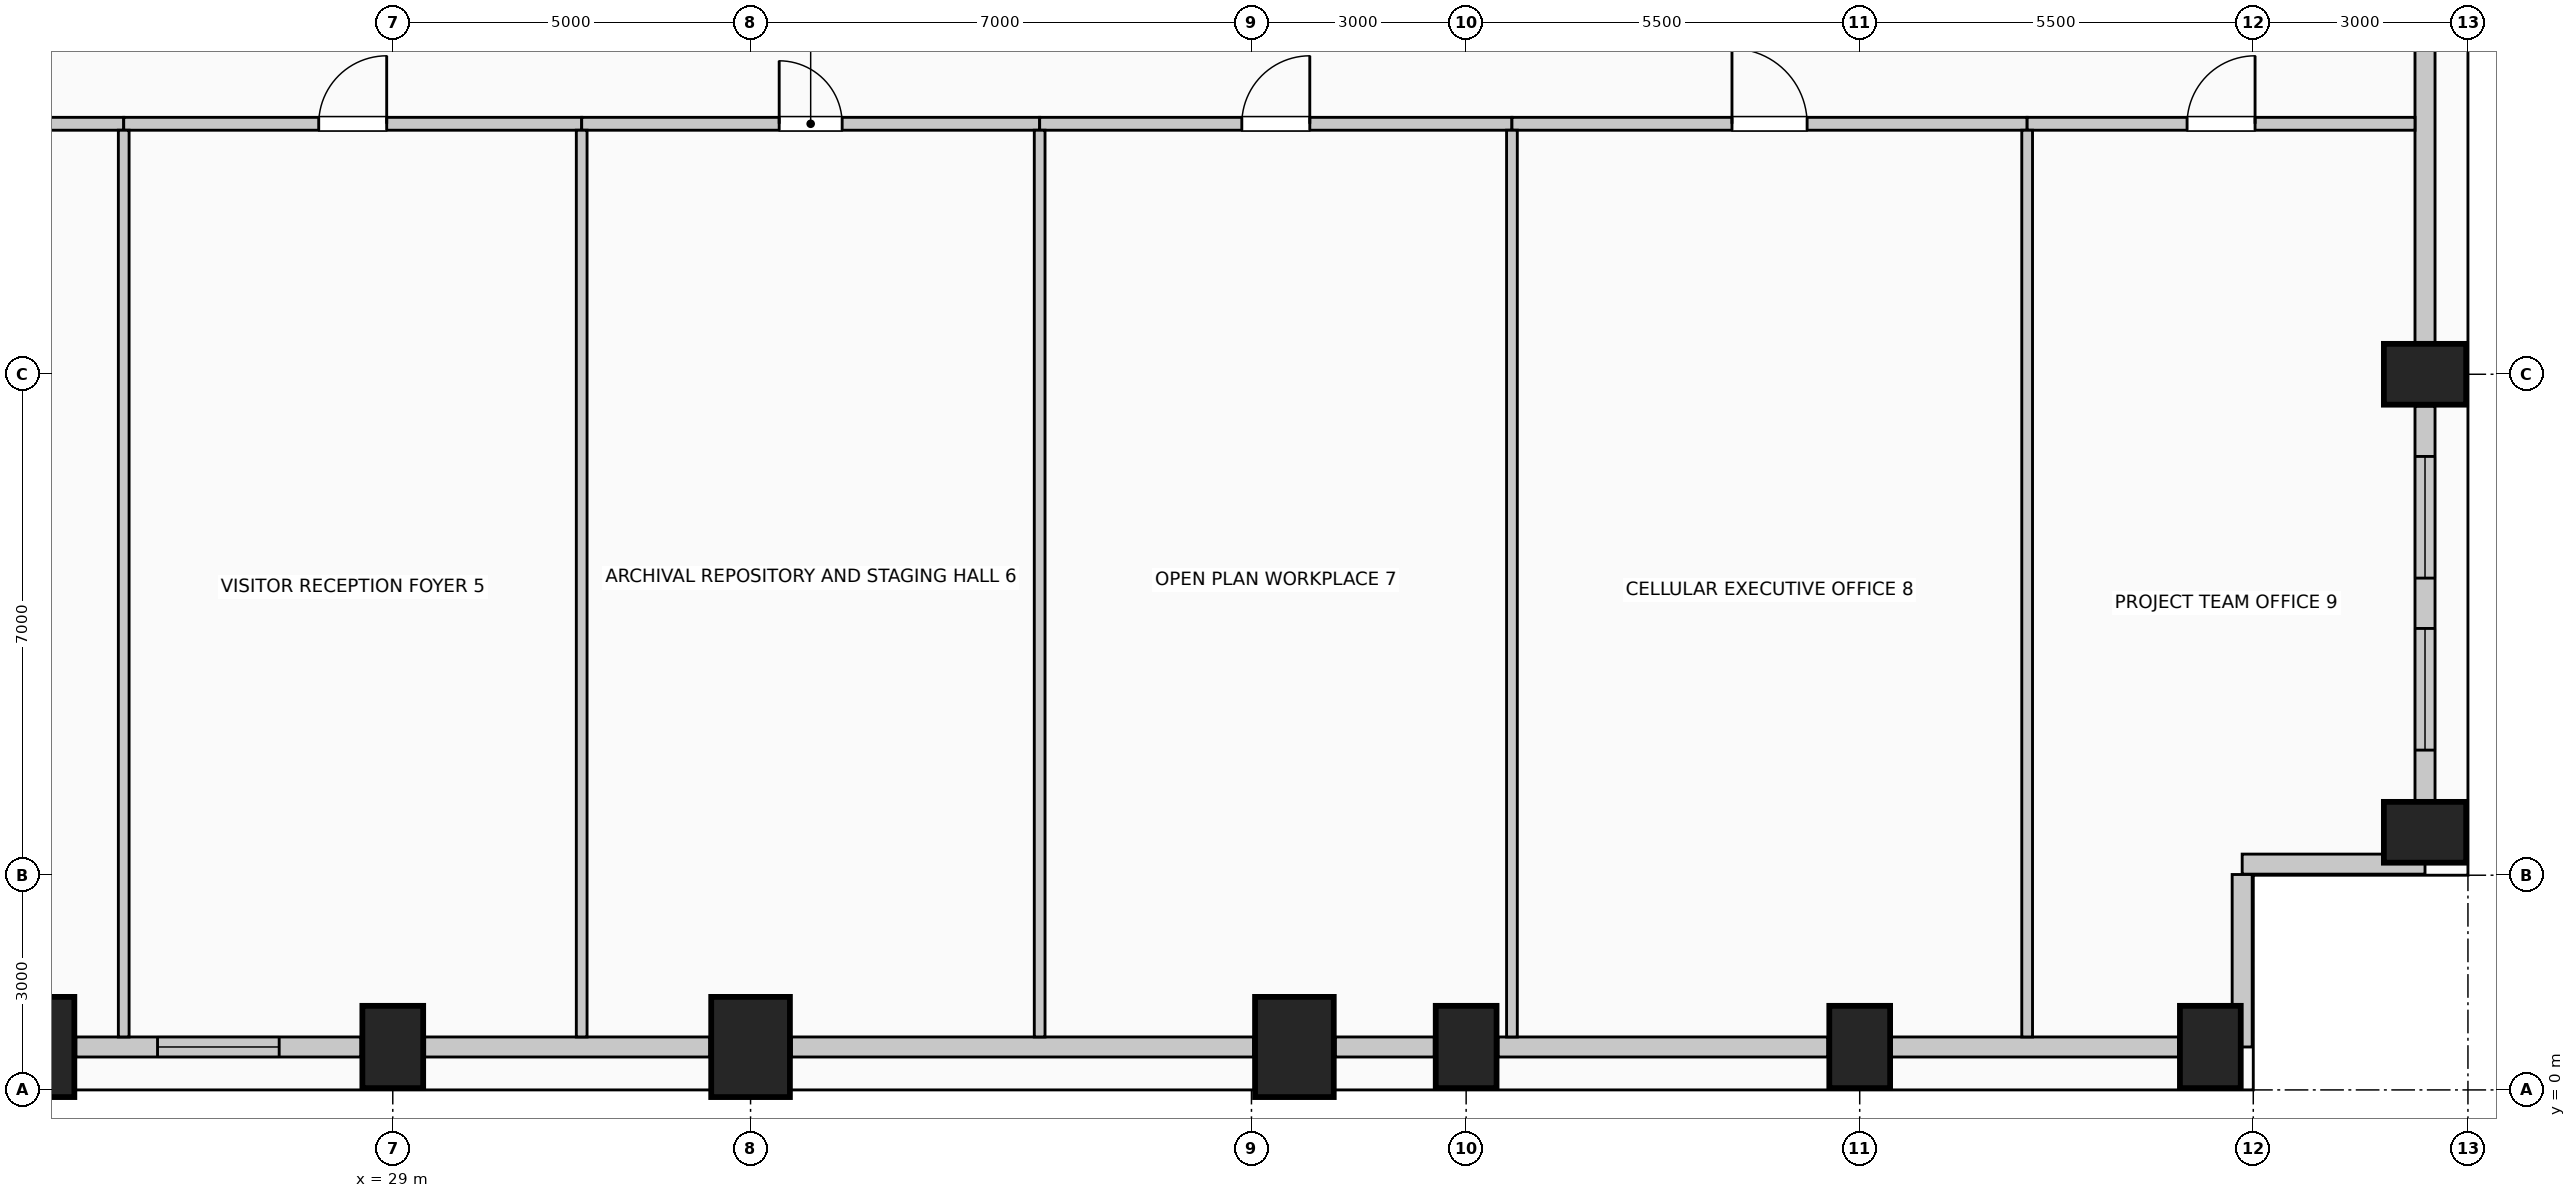
"""IFC4 building model, lengths in metres.
Left out: names, types, materials, properties, quantities, classifications, styles, units other than length and angle.
Written with IfcOpenShell. Run it as: python <this file> out.ifc"""

import sys

from ifc_helpers import new_model, si_unit, direction, frame, frame_2d, origin, origin_2d, place, context, subcontext, project, spatial, rectangle, extrude, element, fill, save


model = new_model("IFC4")
c1 = context("Model", 3, precision=1e-05, world=origin(), true_north=direction((0.0, 1.0)))
c2 = subcontext(c1, "Body", "Model", "MODEL_VIEW")
j1 = project(units=[si_unit("LENGTHUNIT", "METRE"), si_unit("PLANEANGLEUNIT", "RADIAN")], contexts=[c1])
p1 = place(None, origin())
s1 = spatial("IfcSite", under=j1, at=p1, CompositionType="ELEMENT")
p2 = place(p1, origin())
s2 = spatial("IfcBuilding", under=s1, at=p2, CompositionType="ELEMENT")
p3 = place(p2, frame((0.0, 0.0, 144.6)))
s3 = spatial("IfcBuildingStorey", under=s2, at=p3, CompositionType="ELEMENT", Elevation=144.6)
p4 = place(p3, frame((24.0, 0.6, 0.0), z_axis=(0.0, 0.0, 1.0), x_axis=(1.0, 0.0, 0.0)))
e1 = element("IfcColumn", 1, at=p4, inside=s3, PredefinedType="COLUMN", context=c2, shape_type="SweptSolid", body=[
    extrude(rectangle(XDim=1.1, YDim=1.4, at=origin_2d()), origin(), (0.0, 0.0, 1.0), 4.0),
])
p5 = place(p3, frame((29.0, 0.6, 0.0), z_axis=(0.0, 0.0, 1.0), x_axis=(1.0, 0.0, 0.0)))
e2 = element("IfcColumn", 2, at=p5, inside=s3, PredefinedType="COLUMN", context=c2, shape_type="SweptSolid", body=[
    extrude(rectangle(XDim=0.85, YDim=1.15, at=origin_2d()), origin(), (0.0, 0.0, 1.0), 4.0),
])
for number, where, z_axis, x_axis in (
    (3, (34.0, 0.6, 0.0), (0.0, 0.0, 1.0), (1.0, 0.0, 0.0)),
    (4, (41.6, 0.6, 0.0), (0.0, 0.0, 1.0), (1.0, 0.0, 0.0)),
):
    element("IfcColumn", number, at=place(p3, frame(where, z_axis=z_axis, x_axis=x_axis)), inside=s3, PredefinedType="COLUMN", context=c2, shape_type="SweptSolid", body=[
        extrude(rectangle(XDim=1.1, YDim=1.4, at=origin_2d()), origin(), (0.0, 0.0, 1.0), 4.0),
    ])
for number, where, z_axis, x_axis in (
    (5, (44.0, 0.6, 0.0), (0.0, 0.0, 1.0), (1.0, 0.0, 0.0)),
    (6, (49.5, 0.6, 0.0), (0.0, 0.0, 1.0), (1.0, 0.0, 0.0)),
    (7, (54.4, 0.6, 0.0), (0.0, 0.0, 1.0), (1.0, 0.0, 0.0)),
    (8, (57.4, 3.6, 0.0), (0.0, 0.0, 1.0), (0.0, 1.0, 0.0)),
    (9, (57.4, 10.0, 0.0), (0.0, 0.0, 1.0), (0.0, 1.0, 0.0)),
):
    element("IfcColumn", number, at=place(p3, frame(where, z_axis=z_axis, x_axis=x_axis)), inside=s3, PredefinedType="COLUMN", context=c2, shape_type="SweptSolid", body=[
        extrude(rectangle(XDim=0.85, YDim=1.15, at=origin_2d()), origin(), (0.0, 0.0, 1.0), 4.0),
    ])
p6 = place(p3, frame((28.555, 0.6, 0.0), z_axis=(0.0, 0.0, 1.0), x_axis=(-1.0, 0.0, 0.0)))
e10 = element("IfcWall", 10, at=p6, inside=s3, PredefinedType="SOLIDWALL", context=c2, shape_type="SweptSolid", body=[
    extrude(rectangle(XDim=3.985, YDim=0.28, at=frame_2d((1.992, 0.0))), origin(), (0.0, 0.0, 1.0), 2.875),
])
p7 = place(p6, frame((1.143, 0.0, 0.5)))
e11 = element("IfcOpeningElement", 11, at=p7, cuts=e10, PredefinedType="OPENING", context=c2, shape_type="SweptSolid", body=[
    extrude(rectangle(XDim=1.7, YDim=1.95, at=frame_2d((0.85, 0.975))), frame((0.0, 0.15, 0.0), z_axis=(0.0, -1.0, 0.0), x_axis=(1.0, 0.0, 0.0)), (0.0, 0.0, 1.0), 0.3),
])
p8 = place(p3, frame((33.43, 0.6, 0.0), z_axis=(0.0, 0.0, 1.0), x_axis=(-1.0, 0.0, 0.0)))
e12 = element("IfcWall", 12, at=p8, inside=s3, PredefinedType="SOLIDWALL", context=c2, shape_type="SweptSolid", body=[
    extrude(rectangle(XDim=3.985, YDim=0.28, at=frame_2d((1.992, 0.0))), origin(), (0.0, 0.0, 1.0), 2.875),
])
p9 = place(p3, frame((41.03, 0.6, 0.0), z_axis=(0.0, 0.0, 1.0), x_axis=(-1.0, 0.0, 0.0)))
e13 = element("IfcWall", 13, at=p9, inside=s3, PredefinedType="SOLIDWALL", context=c2, shape_type="SweptSolid", body=[
    extrude(rectangle(XDim=6.46, YDim=0.28, at=frame_2d((3.23, 0.0))), origin(), (0.0, 0.0, 1.0), 2.875),
])
p10 = place(p3, frame((43.555, 0.6, 0.0), z_axis=(0.0, 0.0, 1.0), x_axis=(-1.0, 0.0, 0.0)))
e14 = element("IfcWall", 14, at=p10, inside=s3, PredefinedType="SOLIDWALL", context=c2, shape_type="SweptSolid", body=[
    extrude(rectangle(XDim=1.385, YDim=0.28, at=frame_2d((0.692, 0.0))), origin(), (0.0, 0.0, 1.0), 2.875),
])
p11 = place(p3, frame((49.055, 0.6, 0.0), z_axis=(0.0, 0.0, 1.0), x_axis=(-1.0, 0.0, 0.0)))
e15 = element("IfcWall", 15, at=p11, inside=s3, PredefinedType="SOLIDWALL", context=c2, shape_type="SweptSolid", body=[
    extrude(rectangle(XDim=4.61, YDim=0.28, at=frame_2d((2.305, 0.0))), origin(), (0.0, 0.0, 1.0), 2.875),
])
p12 = place(p3, frame((53.955, 0.6, 0.0), z_axis=(0.0, 0.0, 1.0), x_axis=(-1.0, 0.0, 0.0)))
e16 = element("IfcWall", 16, at=p12, inside=s3, PredefinedType="SOLIDWALL", context=c2, shape_type="SweptSolid", body=[
    extrude(rectangle(XDim=4.01, YDim=0.28, at=frame_2d((2.005, 0.0))), origin(), (0.0, 0.0, 1.0), 2.875),
])
p13 = place(p3, frame((57.4, 9.555, 0.0), z_axis=(0.0, 0.0, 1.0), x_axis=(0.0, -1.0, 0.0)))
e17 = element("IfcWall", 17, at=p13, inside=s3, PredefinedType="SOLIDWALL", context=c2, shape_type="SweptSolid", body=[
    extrude(rectangle(XDim=5.51, YDim=0.28, at=frame_2d((2.755, 0.0))), origin(), (0.0, 0.0, 1.0), 2.875),
])
p14 = place(p13, frame((0.703, 0.0, 0.5)))
e18 = element("IfcOpeningElement", 18, at=p14, cuts=e17, PredefinedType="OPENING", context=c2, shape_type="SweptSolid", body=[
    extrude(rectangle(XDim=1.7, YDim=1.95, at=frame_2d((0.85, 0.975))), frame((0.0, 0.15, 0.0), z_axis=(0.0, -1.0, 0.0), x_axis=(1.0, 0.0, 0.0)), (0.0, 0.0, 1.0), 0.3),
])
p15 = place(p13, frame((3.107, 0.0, 0.5)))
e19 = element("IfcOpeningElement", 19, at=p15, cuts=e17, PredefinedType="OPENING", context=c2, shape_type="SweptSolid", body=[
    extrude(rectangle(XDim=1.7, YDim=1.95, at=frame_2d((0.85, 0.975))), frame((0.0, 0.15, 0.0), z_axis=(0.0, -1.0, 0.0), x_axis=(1.0, 0.0, 0.0)), (0.0, 0.0, 1.0), 0.3),
])
p16 = place(p3, frame((57.4, 17.555, 0.0), z_axis=(0.0, 0.0, 1.0), x_axis=(0.0, -1.0, 0.0)))
e20 = element("IfcWall", 20, at=p16, inside=s3, PredefinedType="SOLIDWALL", context=c2, shape_type="SweptSolid", body=[
    extrude(rectangle(XDim=7.11, YDim=0.28, at=frame_2d((3.555, 0.0))), origin(), (0.0, 0.0, 1.0), 2.875),
])
p17 = place(p3, frame((57.4, 3.155, 0.0), z_axis=(0.0, 0.0, 1.0), x_axis=(-1.0, 0.0, 0.0)))
e21 = element("IfcWall", 21, at=p17, inside=s3, PredefinedType="SOLIDWALL", context=c2, shape_type="SweptSolid", body=[
    extrude(rectangle(XDim=2.555, YDim=0.28, at=frame_2d((1.277, 0.0))), origin(), (0.0, 0.0, 1.0), 3.725),
])
p18 = place(p3, frame((54.845, 3.01, 0.0), z_axis=(0.0, 0.0, 1.0), x_axis=(0.0, -1.0, 0.0)))
e22 = element("IfcWall", 22, at=p18, inside=s3, PredefinedType="SOLIDWALL", context=c2, shape_type="SweptSolid", body=[
    extrude(rectangle(XDim=2.41, YDim=0.28, at=frame_2d((1.205, 0.0))), origin(), (0.0, 0.0, 1.0), 3.725),
])
p19 = place(p3, frame((19.04, 13.5, 0.0), z_axis=(0.0, 0.0, 1.0), x_axis=(1.0, 0.0, 0.0)))
e23 = element("IfcWall", 23, at=p19, inside=s3, PredefinedType="PARTITIONING", context=c2, shape_type="SweptSolid", body=[
    extrude(rectangle(XDim=6.2, YDim=0.18, at=frame_2d((3.1, 0.0))), origin(), (0.0, 0.0, 1.0), 3.725),
])
p20 = place(p19, frame((2.575, 0.0, 0.0)))
e24 = element("IfcOpeningElement", 24, at=p20, cuts=e23, PredefinedType="OPENING", context=c2, shape_type="SweptSolid", body=[
    extrude(rectangle(XDim=1.05, YDim=2.15, at=frame_2d((0.525, 1.075))), frame((0.0, 0.1, 0.0), z_axis=(0.0, -1.0, 0.0), x_axis=(1.0, 0.0, 0.0)), (0.0, 0.0, 1.0), 0.2),
])
p21 = place(p3, frame((25.24, 13.5, 0.0), z_axis=(0.0, 0.0, 1.0), x_axis=(1.0, 0.0, 0.0)))
e25 = element("IfcWall", 25, at=p21, inside=s3, PredefinedType="PARTITIONING", context=c2, shape_type="SweptSolid", body=[
    extrude(rectangle(XDim=6.4, YDim=0.18, at=frame_2d((3.2, 0.0))), origin(), (0.0, 0.0, 1.0), 3.725),
])
p22 = place(p21, frame((2.725, 0.0, 0.0)))
e26 = element("IfcOpeningElement", 26, at=p22, cuts=e25, PredefinedType="OPENING", context=c2, shape_type="SweptSolid", body=[
    extrude(rectangle(XDim=0.95, YDim=2.15, at=frame_2d((0.475, 1.075))), frame((0.0, 0.1, 0.0), z_axis=(0.0, -1.0, 0.0), x_axis=(1.0, 0.0, 0.0)), (0.0, 0.0, 1.0), 0.2),
])
p23 = place(p3, frame((31.64, 13.5, 0.0), z_axis=(0.0, 0.0, 1.0), x_axis=(1.0, 0.0, 0.0)))
e27 = element("IfcWall", 27, at=p23, inside=s3, PredefinedType="PARTITIONING", context=c2, shape_type="SweptSolid", body=[
    extrude(rectangle(XDim=6.4, YDim=0.18, at=frame_2d((3.2, 0.0))), origin(), (0.0, 0.0, 1.0), 3.725),
])
p24 = place(p23, frame((2.76, 0.0, 0.0)))
e28 = element("IfcOpeningElement", 28, at=p24, cuts=e27, PredefinedType="OPENING", context=c2, shape_type="SweptSolid", body=[
    extrude(rectangle(XDim=0.88, YDim=2.1, at=frame_2d((0.44, 1.05))), frame((0.0, 0.1, 0.0), z_axis=(0.0, -1.0, 0.0), x_axis=(1.0, 0.0, 0.0)), (0.0, 0.0, 1.0), 0.2),
])
p25 = place(p3, frame((38.04, 13.5, 0.0), z_axis=(0.0, 0.0, 1.0), x_axis=(1.0, 0.0, 0.0)))
e29 = element("IfcWall", 29, at=p25, inside=s3, PredefinedType="PARTITIONING", context=c2, shape_type="SweptSolid", body=[
    extrude(rectangle(XDim=6.6, YDim=0.18, at=frame_2d((3.3, 0.0))), origin(), (0.0, 0.0, 1.0), 3.725),
])
p26 = place(p25, frame((2.825, 0.0, 0.0)))
e30 = element("IfcOpeningElement", 30, at=p26, cuts=e29, PredefinedType="OPENING", context=c2, shape_type="SweptSolid", body=[
    extrude(rectangle(XDim=0.95, YDim=2.15, at=frame_2d((0.475, 1.075))), frame((0.0, 0.1, 0.0), z_axis=(0.0, -1.0, 0.0), x_axis=(1.0, 0.0, 0.0)), (0.0, 0.0, 1.0), 0.2),
])
p27 = place(p3, frame((44.64, 13.5, 0.0), z_axis=(0.0, 0.0, 1.0), x_axis=(1.0, 0.0, 0.0)))
e31 = element("IfcWall", 31, at=p27, inside=s3, PredefinedType="PARTITIONING", context=c2, shape_type="SweptSolid", body=[
    extrude(rectangle(XDim=7.2, YDim=0.18, at=frame_2d((3.6, 0.0))), origin(), (0.0, 0.0, 1.0), 3.725),
])
p28 = place(p27, frame((3.075, 0.0, 0.0)))
e32 = element("IfcOpeningElement", 32, at=p28, cuts=e31, PredefinedType="OPENING", context=c2, shape_type="SweptSolid", body=[
    extrude(rectangle(XDim=1.05, YDim=2.15, at=frame_2d((0.525, 1.075))), frame((0.0, 0.1, 0.0), z_axis=(0.0, -1.0, 0.0), x_axis=(1.0, 0.0, 0.0)), (0.0, 0.0, 1.0), 0.2),
])
p29 = place(p3, frame((51.84, 13.5, 0.0), z_axis=(0.0, 0.0, 1.0), x_axis=(1.0, 0.0, 0.0)))
e33 = element("IfcWall", 33, at=p29, inside=s3, PredefinedType="PARTITIONING", context=c2, shape_type="SweptSolid", body=[
    extrude(rectangle(XDim=5.42, YDim=0.18, at=frame_2d((2.71, 0.0))), origin(), (0.0, 0.0, 1.0), 3.725),
])
p30 = place(p29, frame((2.235, 0.0, 0.0)))
e34 = element("IfcOpeningElement", 34, at=p30, cuts=e33, PredefinedType="OPENING", context=c2, shape_type="SweptSolid", body=[
    extrude(rectangle(XDim=0.95, YDim=2.15, at=frame_2d((0.475, 1.075))), frame((0.0, 0.1, 0.0), z_axis=(0.0, -1.0, 0.0), x_axis=(1.0, 0.0, 0.0)), (0.0, 0.0, 1.0), 0.2),
])
for number, where, z_axis, x_axis in (
    (35, (25.24, 0.74, 0.0), (0.0, 0.0, 1.0), (0.0, 1.0, 0.0)),
    (36, (31.64, 0.74, 0.0), (0.0, 0.0, 1.0), (0.0, 1.0, 0.0)),
    (37, (38.04, 0.74, 0.0), (0.0, 0.0, 1.0), (0.0, 1.0, 0.0)),
    (38, (44.64, 0.74, 0.0), (0.0, 0.0, 1.0), (0.0, 1.0, 0.0)),
    (39, (51.84, 0.74, 0.0), (0.0, 0.0, 1.0), (0.0, 1.0, 0.0)),
):
    element("IfcWall", number, at=place(p3, frame(where, z_axis=z_axis, x_axis=x_axis)), inside=s3, PredefinedType="PARTITIONING", context=c2, shape_type="SweptSolid", body=[
        extrude(rectangle(XDim=12.67, YDim=0.15, at=frame_2d((6.335, 0.0))), origin(), (0.0, 0.0, 1.0), 3.725),
    ])
p31 = place(p7, origin())
e40 = element("IfcWindow", 40, at=p31, inside=s3, PartitioningType="SINGLE_PANEL", PredefinedType="WINDOW", context=c2, shape_type="SweptSolid", body=[
    extrude(rectangle(XDim=1.7, YDim=1.95, at=frame_2d((0.85, 0.975))), frame((0.0, 0.03, 0.0), z_axis=(0.0, -1.0, 0.0), x_axis=(1.0, 0.0, 0.0)), (0.0, 0.0, 1.0), 0.06),
])
fill(e11, e40)
p32 = place(p14, origin())
e41 = element("IfcWindow", 41, at=p32, inside=s3, PartitioningType="SINGLE_PANEL", PredefinedType="WINDOW", context=c2, shape_type="SweptSolid", body=[
    extrude(rectangle(XDim=1.7, YDim=1.95, at=frame_2d((0.85, 0.975))), frame((0.0, 0.03, 0.0), z_axis=(0.0, -1.0, 0.0), x_axis=(1.0, 0.0, 0.0)), (0.0, 0.0, 1.0), 0.06),
])
fill(e18, e41)
p33 = place(p15, origin())
e42 = element("IfcWindow", 42, at=p33, inside=s3, PartitioningType="SINGLE_PANEL", PredefinedType="WINDOW", context=c2, shape_type="SweptSolid", body=[
    extrude(rectangle(XDim=1.7, YDim=1.95, at=frame_2d((0.85, 0.975))), frame((0.0, 0.03, 0.0), z_axis=(0.0, -1.0, 0.0), x_axis=(1.0, 0.0, 0.0)), (0.0, 0.0, 1.0), 0.06),
])
fill(e19, e42)
p34 = place(p22, origin())
e43 = element("IfcDoor", 43, at=p34, inside=s3, OperationType="SINGLE_SWING_RIGHT", PredefinedType="DOOR", context=c2, shape_type="SweptSolid", body=[
    extrude(rectangle(XDim=0.95, YDim=2.15, at=frame_2d((0.475, 1.075))), frame((0.0, 0.025, 0.0), z_axis=(0.0, -1.0, 0.0), x_axis=(1.0, 0.0, 0.0)), (0.0, 0.0, 1.0), 0.05),
])
fill(e26, e43)
p35 = place(p24, origin())
e44 = element("IfcDoor", 44, at=p35, inside=s3, OperationType="SINGLE_SWING_LEFT", PredefinedType="DOOR", context=c2, shape_type="SweptSolid", body=[
    extrude(rectangle(XDim=0.88, YDim=2.1, at=frame_2d((0.44, 1.05))), frame((0.0, 0.025, 0.0), z_axis=(0.0, -1.0, 0.0), x_axis=(1.0, 0.0, 0.0)), (0.0, 0.0, 1.0), 0.05),
])
fill(e28, e44)
p36 = place(p26, origin())
e45 = element("IfcDoor", 45, at=p36, inside=s3, OperationType="SINGLE_SWING_RIGHT", PredefinedType="DOOR", context=c2, shape_type="SweptSolid", body=[
    extrude(rectangle(XDim=0.95, YDim=2.15, at=frame_2d((0.475, 1.075))), frame((0.0, 0.025, 0.0), z_axis=(0.0, -1.0, 0.0), x_axis=(1.0, 0.0, 0.0)), (0.0, 0.0, 1.0), 0.05),
])
fill(e30, e45)
p37 = place(p28, origin())
e46 = element("IfcDoor", 46, at=p37, inside=s3, OperationType="SINGLE_SWING_LEFT", PredefinedType="DOOR", context=c2, shape_type="SweptSolid", body=[
    extrude(rectangle(XDim=1.05, YDim=2.15, at=frame_2d((0.525, 1.075))), frame((0.0, 0.025, 0.0), z_axis=(0.0, -1.0, 0.0), x_axis=(1.0, 0.0, 0.0)), (0.0, 0.0, 1.0), 0.05),
])
fill(e32, e46)
p38 = place(p30, origin())
e47 = element("IfcDoor", 47, at=p38, inside=s3, OperationType="SINGLE_SWING_RIGHT", PredefinedType="DOOR", context=c2, shape_type="SweptSolid", body=[
    extrude(rectangle(XDim=0.95, YDim=2.15, at=frame_2d((0.475, 1.075))), frame((0.0, 0.025, 0.0), z_axis=(0.0, -1.0, 0.0), x_axis=(1.0, 0.0, 0.0)), (0.0, 0.0, 1.0), 0.05),
])
fill(e34, e47)
save(model, sys.argv[1])
